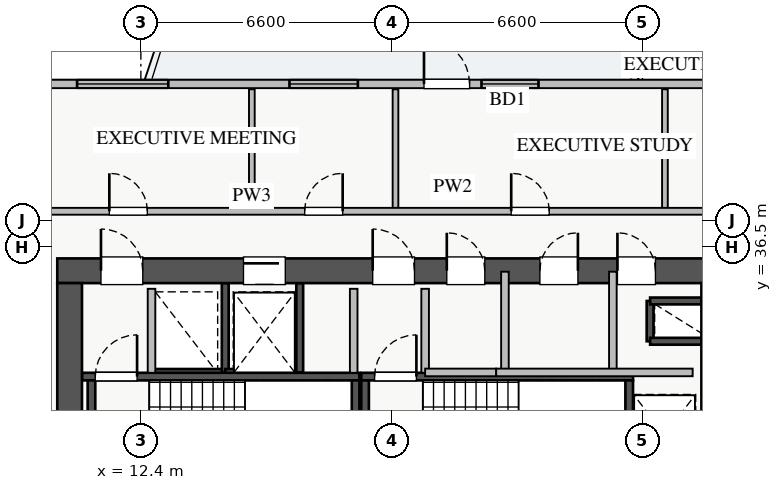
"""IFC4 building model, lengths in metres.
Left out: names, types, materials, properties, quantities, classifications, styles, units other than length and angle.
Written with IfcOpenShell. Run it as: python <this file> out.ifc"""

import sys

from ifc_helpers import new_model, si_unit, direction, frame, frame_2d, origin, place, context, subcontext, project, spatial, rectangle, extrude, source, transform, mapped, element, fill, save


model = new_model("IFC4")
c1 = context("Model", 3, precision=1e-05, world=origin(), true_north=direction((0.0, 1.0)))
c2 = subcontext(c1, "Body", "Model", "MODEL_VIEW")
j1 = project(units=[si_unit("LENGTHUNIT", "METRE"), si_unit("PLANEANGLEUNIT", "RADIAN")], contexts=[c1])
p1 = place(None, origin())
s1 = spatial("IfcSite", under=j1, at=p1, CompositionType="ELEMENT")
p2 = place(p1, origin())
s2 = spatial("IfcBuilding", under=s1, at=p2, CompositionType="ELEMENT")
p3 = place(p2, frame((0.0, 0.0, 100.25)))
s3 = spatial("IfcBuildingStorey", under=s2, at=p3, CompositionType="ELEMENT", Elevation=100.25)
p4 = place(p3, frame((12.68, 33.2, 0.0), z_axis=(0.0, 0.0, 1.0), x_axis=(1.0, 0.0, 0.0)))
e1 = element("IfcWall", 1, at=p4, inside=s3, PredefinedType="SHEAR", context=c2, shape_type="SweptSolid", body=[
    extrude(rectangle(XDim=1.94, YDim=0.18, at=frame_2d((0.97, 0.0))), origin(), (0.0, 0.0, 1.0), 3.07),
])
p5 = place(p3, frame((14.62, 33.2, 0.0), z_axis=(0.0, 0.0, 1.0), x_axis=(0.0, 1.0, 0.0)))
e2 = element("IfcWall", 2, at=p5, inside=s3, PredefinedType="SHEAR", context=c2, shape_type="SweptSolid", body=[
    extrude(rectangle(XDim=2.35, YDim=0.18, at=frame_2d((1.175, 0.0))), origin(), (0.0, 0.0, 1.0), 3.07),
])
p6 = place(p3, frame((25.8, 34.02, 0.0), z_axis=(0.0, 0.0, 1.0), x_axis=(0.0, 1.0, 0.0)))
e3 = element("IfcWall", 3, at=p6, inside=s3, PredefinedType="SHEAR", context=c2, shape_type="SweptSolid", body=[
    extrude(rectangle(XDim=1.06, YDim=0.18, at=frame_2d((0.53, 0.0))), origin(), (0.0, 0.0, 1.0), 3.07),
])
for number, where, z_axis, x_axis in (
    (4, (25.8, 35.08, 0.0), (0.0, 0.0, 1.0), (1.0, 0.0, 0.0)),
    (5, (25.8, 34.02, 0.0), (0.0, 0.0, 1.0), (1.0, 0.0, 0.0)),
):
    element("IfcWall", number, at=place(p3, frame(where, z_axis=z_axis, x_axis=x_axis)), inside=s3, PredefinedType="SHEAR", context=c2, shape_type="SweptSolid", body=[
        extrude(rectangle(XDim=1.35, YDim=0.18, at=frame_2d((0.675, 0.0))), origin(), (0.0, 0.0, 1.0), 3.07),
    ])
p7 = place(p3, frame((14.62, 33.2, 0.0), z_axis=(0.0, 0.0, 1.0), x_axis=(1.0, 0.0, 0.0)))
e6 = element("IfcWall", 6, at=p7, inside=s3, PredefinedType="SHEAR", context=c2, shape_type="SweptSolid", body=[
    extrude(rectangle(XDim=1.96, YDim=0.18, at=frame_2d((0.98, 0.0))), origin(), (0.0, 0.0, 1.0), 3.07),
])
p8 = place(p3, frame((16.58, 33.2, 0.0), z_axis=(0.0, 0.0, 1.0), x_axis=(0.0, 1.0, 0.0)))
e7 = element("IfcWall", 7, at=p8, inside=s3, PredefinedType="SHEAR", context=c2, shape_type="SweptSolid", body=[
    extrude(rectangle(XDim=2.35, YDim=0.18, at=frame_2d((1.175, 0.0))), origin(), (0.0, 0.0, 1.0), 3.07),
])
p9 = place(p3, frame((10.85, 33.09, 0.0), z_axis=(0.0, 0.0, 1.0), x_axis=(1.0, 0.0, 0.0)))
e8 = element("IfcWall", 8, at=p9, inside=s3, PredefinedType="SHEAR", context=c2, shape_type="SweptSolid", body=[
    extrude(rectangle(XDim=7.3, YDim=0.2, at=frame_2d((3.65, 0.0))), origin(), (0.0, 0.0, 1.0), 3.25),
])
p10 = place(p9, frame((0.35, 0.0, 0.0)))
e9 = element("IfcOpeningElement", 9, at=p10, cuts=e8, PredefinedType="OPENING", context=c2, shape_type="SweptSolid", body=[
    extrude(rectangle(XDim=1.1, YDim=2.05, at=frame_2d((0.55, 1.025))), frame((0.0, 0.11, 0.0), z_axis=(0.0, -1.0, 0.0), x_axis=(1.0, 0.0, 0.0)), (0.0, 0.0, 1.0), 0.22),
])
for number, where, z_axis, x_axis in (
    (10, (11.1, 30.05, 0.0), (0.0, 0.0, 1.0), (0.0, 1.0, 0.0)),
    (11, (18.05, 30.05, 0.0), (0.0, 0.0, 1.0), (0.0, 1.0, 0.0)),
):
    element("IfcWall", number, at=place(p3, frame(where, z_axis=z_axis, x_axis=x_axis)), inside=s3, PredefinedType="SHEAR", context=c2, shape_type="SweptSolid", body=[
        extrude(rectangle(XDim=2.94, YDim=0.2, at=frame_2d((1.47, 0.0))), origin(), (0.0, 0.0, 1.0), 3.25),
    ])
p11 = place(p3, frame((18.2, 33.09, 0.0), z_axis=(0.0, 0.0, 1.0), x_axis=(1.0, 0.0, 0.0)))
e12 = element("IfcWall", 12, at=p11, inside=s3, PredefinedType="SHEAR", context=c2, shape_type="SweptSolid", body=[
    extrude(rectangle(XDim=7.15, YDim=0.2, at=frame_2d((3.575, 0.0))), origin(), (0.0, 0.0, 1.0), 3.25),
])
p12 = place(p11, frame((0.35, 0.0, 0.0)))
e13 = element("IfcOpeningElement", 13, at=p12, cuts=e12, PredefinedType="OPENING", context=c2, shape_type="SweptSolid", body=[
    extrude(rectangle(XDim=1.1, YDim=2.05, at=frame_2d((0.55, 1.025))), frame((0.0, 0.11, 0.0), z_axis=(0.0, -1.0, 0.0), x_axis=(1.0, 0.0, 0.0)), (0.0, 0.0, 1.0), 0.22),
])
for number, where, z_axis, x_axis in (
    (14, (18.3, 30.05, 0.0), (0.0, 0.0, 1.0), (0.0, 1.0, 0.0)),
    (15, (25.25, 30.05, 0.0), (0.0, 0.0, 1.0), (0.0, 1.0, 0.0)),
):
    element("IfcWall", number, at=place(p3, frame(where, z_axis=z_axis, x_axis=x_axis)), inside=s3, PredefinedType="SHEAR", context=c2, shape_type="SweptSolid", body=[
        extrude(rectangle(XDim=2.94, YDim=0.2, at=frame_2d((1.47, 0.0))), origin(), (0.0, 0.0, 1.0), 3.25),
    ])
p13 = place(p3, frame((10.2, 35.875, 0.0), z_axis=(0.0, 0.0, 1.0), x_axis=(1.0, 0.0, 0.0)))
e16 = element("IfcWall", 16, at=p13, inside=s3, PredefinedType="SHEAR", context=c2, shape_type="SweptSolid", body=[
    extrude(rectangle(XDim=17.6, YDim=0.65, at=frame_2d((8.8, 0.0))), origin(), (0.0, 0.0, 1.0), 3.25),
])
p14 = place(p13, frame((1.15, 0.0, 0.0)))
e17 = element("IfcOpeningElement", 17, at=p14, cuts=e16, PredefinedType="OPENING", context=c2, shape_type="SweptSolid", body=[
    extrude(rectangle(XDim=1.1, YDim=2.05, at=frame_2d((0.55, 1.025))), frame((0.0, 0.335, 0.0), z_axis=(0.0, -1.0, 0.0), x_axis=(1.0, 0.0, 0.0)), (0.0, 0.0, 1.0), 0.67),
])
p15 = place(p13, frame((8.3, 0.0, 0.0)))
e18 = element("IfcOpeningElement", 18, at=p15, cuts=e16, PredefinedType="OPENING", context=c2, shape_type="SweptSolid", body=[
    extrude(rectangle(XDim=1.1, YDim=2.05, at=frame_2d((0.55, 1.025))), frame((0.0, 0.335, 0.0), z_axis=(0.0, -1.0, 0.0), x_axis=(1.0, 0.0, 0.0)), (0.0, 0.0, 1.0), 0.67),
])
p16 = place(p13, frame((4.9, 0.0, 0.0)))
e19 = element("IfcOpeningElement", 19, at=p16, cuts=e16, PredefinedType="OPENING", context=c2, shape_type="SweptSolid", body=[
    extrude(rectangle(XDim=1.1, YDim=2.05, at=frame_2d((0.55, 1.025))), frame((0.0, 0.335, 0.0), z_axis=(0.0, -1.0, 0.0), x_axis=(1.0, 0.0, 0.0)), (0.0, 0.0, 1.0), 0.67),
])
p17 = place(p13, frame((14.74, 0.0, 0.0)))
e20 = element("IfcOpeningElement", 20, at=p17, cuts=e16, PredefinedType="OPENING", context=c2, shape_type="SweptSolid", body=[
    extrude(rectangle(XDim=1.0, YDim=2.05, at=frame_2d((0.5, 1.025))), frame((0.0, 0.335, 0.0), z_axis=(0.0, -1.0, 0.0), x_axis=(1.0, 0.0, 0.0)), (0.0, 0.0, 1.0), 0.67),
])
p18 = place(p13, frame((10.25, 0.0, 0.0)))
e21 = element("IfcOpeningElement", 21, at=p18, cuts=e16, PredefinedType="OPENING", context=c2, shape_type="SweptSolid", body=[
    extrude(rectangle(XDim=1.0, YDim=2.05, at=frame_2d((0.5, 1.025))), frame((0.0, 0.335, 0.0), z_axis=(0.0, -1.0, 0.0), x_axis=(1.0, 0.0, 0.0)), (0.0, 0.0, 1.0), 0.67),
])
p19 = place(p13, frame((12.7, 0.0, 0.0)))
e22 = element("IfcOpeningElement", 22, at=p19, cuts=e16, PredefinedType="OPENING", context=c2, shape_type="SweptSolid", body=[
    extrude(rectangle(XDim=1.0, YDim=2.05, at=frame_2d((0.5, 1.025))), frame((0.0, 0.335, 0.0), z_axis=(0.0, -1.0, 0.0), x_axis=(1.0, 0.0, 0.0)), (0.0, 0.0, 1.0), 0.67),
])
p20 = place(p3, frame((10.525, 29.65, 0.0), z_axis=(0.0, 0.0, 1.0), x_axis=(0.0, 1.0, 0.0)))
e23 = element("IfcWall", 23, at=p20, inside=s3, PredefinedType="SHEAR", context=c2, shape_type="SweptSolid", body=[
    extrude(rectangle(XDim=5.9, YDim=0.65, at=frame_2d((2.95, 0.0))), origin(), (0.0, 0.0, 1.0), 3.25),
])
p21 = place(p3, frame((27.475, 29.65, 0.0), z_axis=(0.0, 0.0, 1.0), x_axis=(0.0, 1.0, 0.0)))
e24 = element("IfcWall", 24, at=p21, inside=s3, PredefinedType="SHEAR", context=c2, shape_type="SweptSolid", body=[
    extrude(rectangle(XDim=5.9, YDim=0.65, at=frame_2d((2.95, 0.0))), origin(), (0.0, 0.0, 1.0), 3.25),
])
p22 = place(p21, frame((1.1, 0.0, 0.0)))
e25 = element("IfcOpeningElement", 25, at=p22, cuts=e24, PredefinedType="OPENING", context=c2, shape_type="SweptSolid", body=[
    extrude(rectangle(XDim=1.3, YDim=2.05, at=frame_2d((0.65, 1.025))), frame((0.0, 0.335, 0.0), z_axis=(0.0, -1.0, 0.0), x_axis=(1.0, 0.0, 0.0)), (0.0, 0.0, 1.0), 0.67),
])
p23 = place(p3, frame((6.55, 40.79, 0.0), z_axis=(0.0, 0.0, 1.0), x_axis=(1.0, 0.0, 0.0)))
e26 = element("IfcWall", 26, at=p23, inside=s3, PredefinedType="STANDARD", context=c2, shape_type="SweptSolid", body=[
    extrude(rectangle(XDim=24.9, YDim=0.22, at=frame_2d((12.45, 0.0))), origin(), (0.0, 0.0, 1.0), 2.61),
])
p24 = place(p23, frame((13.3, 0.0, 0.0)))
e27 = element("IfcOpeningElement", 27, at=p24, cuts=e26, PredefinedType="OPENING", context=c2, shape_type="SweptSolid", body=[
    extrude(rectangle(XDim=1.2, YDim=2.1, at=frame_2d((0.6, 1.05))), frame((0.0, 0.12, 0.0), z_axis=(0.0, -1.0, 0.0), x_axis=(1.0, 0.0, 0.0)), (0.0, 0.0, 1.0), 0.24),
])
p25 = place(p23, frame((0.393, 0.0, 0.9)))
e28 = element("IfcOpeningElement", 28, at=p25, cuts=e26, PredefinedType="OPENING", context=c2, shape_type="SweptSolid", body=[
    extrude(rectangle(XDim=1.5, YDim=1.5, at=frame_2d((0.75, 0.75))), frame((0.0, 0.12, 0.0), z_axis=(0.0, -1.0, 0.0), x_axis=(1.0, 0.0, 0.0)), (0.0, 0.0, 1.0), 0.24),
])
p26 = place(p23, frame((9.76, 0.0, 0.9)))
e29 = element("IfcOpeningElement", 29, at=p26, cuts=e26, PredefinedType="OPENING", context=c2, shape_type="SweptSolid", body=[
    extrude(rectangle(XDim=1.8, YDim=1.5, at=frame_2d((0.9, 0.75))), frame((0.0, 0.12, 0.0), z_axis=(0.0, -1.0, 0.0), x_axis=(1.0, 0.0, 0.0)), (0.0, 0.0, 1.0), 0.24),
])
p27 = place(p23, frame((14.813, 0.0, 0.9)))
e30 = element("IfcOpeningElement", 30, at=p27, cuts=e26, PredefinedType="OPENING", context=c2, shape_type="SweptSolid", body=[
    extrude(rectangle(XDim=1.5, YDim=1.45, at=frame_2d((0.75, 0.725))), frame((0.0, 0.12, 0.0), z_axis=(0.0, -1.0, 0.0), x_axis=(1.0, 0.0, 0.0)), (0.0, 0.0, 1.0), 0.24),
])
p28 = place(p23, frame((20.738, 0.0, 0.9)))
e31 = element("IfcOpeningElement", 31, at=p28, cuts=e26, PredefinedType="OPENING", context=c2, shape_type="SweptSolid", body=[
    extrude(rectangle(XDim=2.1, YDim=1.48, at=frame_2d((1.05, 0.74))), frame((0.0, 0.12, 0.0), z_axis=(0.0, -1.0, 0.0), x_axis=(1.0, 0.0, 0.0)), (0.0, 0.0, 1.0), 0.24),
])
p29 = place(p23, frame((4.171, 0.0, 0.9)))
e32 = element("IfcOpeningElement", 32, at=p29, cuts=e26, PredefinedType="OPENING", context=c2, shape_type="SweptSolid", body=[
    extrude(rectangle(XDim=2.4, YDim=1.5, at=frame_2d((1.2, 0.75))), frame((0.0, 0.12, 0.0), z_axis=(0.0, -1.0, 0.0), x_axis=(1.0, 0.0, 0.0)), (0.0, 0.0, 1.0), 0.24),
])
for number, where, z_axis, x_axis in (
    (33, (12.68, 33.19, 0.0), (0.0, 0.0, 1.0), (0.0, 1.0, 0.0)),
    (34, (18.0, 33.19, 0.0), (0.0, 0.0, 1.0), (0.0, 1.0, 0.0)),
    (35, (19.88, 33.19, 0.0), (0.0, 0.0, 1.0), (0.0, 1.0, 0.0)),
):
    element("IfcWall", number, at=place(p3, frame(where, z_axis=z_axis, x_axis=x_axis)), inside=s3, PredefinedType="PARTITIONING", context=c2, shape_type="SweptSolid", body=[
        extrude(rectangle(XDim=2.21, YDim=0.2, at=frame_2d((1.105, 0.0))), origin(), (0.0, 0.0, 1.0), 3.07),
    ])
p30 = place(p3, frame((24.82, 33.2, 0.0), z_axis=(0.0, 0.0, 1.0), x_axis=(0.0, 1.0, 0.0)))
e36 = element("IfcWall", 36, at=p30, inside=s3, PredefinedType="PARTITIONING", context=c2, shape_type="SweptSolid", body=[
    extrude(rectangle(XDim=2.65, YDim=0.2, at=frame_2d((1.325, 0.0))), origin(), (0.0, 0.0, 1.0), 3.07),
])
p31 = place(p3, frame((19.88, 33.2, 0.0), z_axis=(0.0, 0.0, 1.0), x_axis=(1.0, 0.0, 0.0)))
e37 = element("IfcWall", 37, at=p31, inside=s3, PredefinedType="PARTITIONING", context=c2, shape_type="SweptSolid", body=[
    extrude(rectangle(XDim=1.87, YDim=0.2, at=frame_2d((0.935, 0.0))), origin(), (0.0, 0.0, 1.0), 3.07),
])
p32 = place(p3, frame((21.98, 33.2, 0.0), z_axis=(0.0, 0.0, 1.0), x_axis=(0.0, 1.0, 0.0)))
e38 = element("IfcWall", 38, at=p32, inside=s3, PredefinedType="PARTITIONING", context=c2, shape_type="SweptSolid", body=[
    extrude(rectangle(XDim=2.65, YDim=0.2, at=frame_2d((1.325, 0.0))), origin(), (0.0, 0.0, 1.0), 3.07),
])
p33 = place(p3, frame((21.75, 33.2, 0.0), z_axis=(0.0, 0.0, 1.0), x_axis=(1.0, 0.0, 0.0)))
e39 = element("IfcWall", 39, at=p33, inside=s3, PredefinedType="PARTITIONING", context=c2, shape_type="SweptSolid", body=[
    extrude(rectangle(XDim=5.17, YDim=0.2, at=frame_2d((2.585, 0.0))), origin(), (0.0, 0.0, 1.0), 3.07),
])
p34 = place(p3, frame((15.32, 37.44, 0.0), z_axis=(0.0, 0.0, 1.0), x_axis=(0.0, 1.0, 0.0)))
e40 = element("IfcWall", 40, at=p34, inside=s3, PredefinedType="PARTITIONING", context=c2, shape_type="SweptSolid", body=[
    extrude(rectangle(XDim=3.21, YDim=0.15, at=frame_2d((1.605, 0.0))), origin(), (0.0, 0.0, 1.0), 3.07),
])
p35 = place(p3, frame((19.1, 37.44, 0.0), z_axis=(0.0, 0.0, 1.0), x_axis=(0.0, 1.0, 0.0)))
e41 = element("IfcWall", 41, at=p35, inside=s3, PredefinedType="PARTITIONING", context=c2, shape_type="SweptSolid", body=[
    extrude(rectangle(XDim=3.21, YDim=0.15, at=frame_2d((1.605, 0.0))), origin(), (0.0, 0.0, 1.0), 2.821),
])
p36 = place(p3, frame((26.19, 37.44, 0.0), z_axis=(0.0, 0.0, 1.0), x_axis=(0.0, 1.0, 0.0)))
e42 = element("IfcWall", 42, at=p36, inside=s3, PredefinedType="PARTITIONING", context=c2, shape_type="SweptSolid", body=[
    extrude(rectangle(XDim=3.21, YDim=0.15, at=frame_2d((1.605, 0.0))), origin(), (0.0, 0.0, 1.0), 3.07),
])
p37 = place(p3, frame((8.82, 37.44, 0.0), z_axis=(0.0, 0.0, 1.0), x_axis=(1.0, 0.0, 0.0)))
e43 = element("IfcWall", 43, at=p37, inside=s3, PredefinedType="PARTITIONING", context=c2, shape_type="SweptSolid", body=[
    extrude(rectangle(XDim=23.58, YDim=0.18, at=frame_2d((11.79, 0.0))), origin(), (0.0, 0.0, 1.0), 3.07),
])
p38 = place(p37, frame((2.75, 0.0, 0.0)))
e44 = element("IfcOpeningElement", 44, at=p38, cuts=e43, PredefinedType="OPENING", context=c2, shape_type="SweptSolid", body=[
    extrude(rectangle(XDim=1.0, YDim=2.05, at=frame_2d((0.5, 1.025))), frame((0.0, 0.1, 0.0), z_axis=(0.0, -1.0, 0.0), x_axis=(1.0, 0.0, 0.0)), (0.0, 0.0, 1.0), 0.2),
])
p39 = place(p37, frame((7.89, 0.0, 0.0)))
e45 = element("IfcOpeningElement", 45, at=p39, cuts=e43, PredefinedType="OPENING", context=c2, shape_type="SweptSolid", body=[
    extrude(rectangle(XDim=1.0, YDim=2.05, at=frame_2d((0.5, 1.025))), frame((0.0, 0.1, 0.0), z_axis=(0.0, -1.0, 0.0), x_axis=(1.0, 0.0, 0.0)), (0.0, 0.0, 1.0), 0.2),
])
p40 = place(p37, frame((13.325, 0.0, 0.0)))
e46 = element("IfcOpeningElement", 46, at=p40, cuts=e43, PredefinedType="OPENING", context=c2, shape_type="SweptSolid", body=[
    extrude(rectangle(XDim=1.0, YDim=2.05, at=frame_2d((0.5, 1.025))), frame((0.0, 0.1, 0.0), z_axis=(0.0, -1.0, 0.0), x_axis=(1.0, 0.0, 0.0)), (0.0, 0.0, 1.0), 0.2),
])
p41 = place(p37, frame((19.765, 0.0, 0.0)))
e47 = element("IfcOpeningElement", 47, at=p41, cuts=e43, PredefinedType="OPENING", context=c2, shape_type="SweptSolid", body=[
    extrude(rectangle(XDim=1.0, YDim=2.05, at=frame_2d((0.5, 1.025))), frame((0.0, 0.1, 0.0), z_axis=(0.0, -1.0, 0.0), x_axis=(1.0, 0.0, 0.0)), (0.0, 0.0, 1.0), 0.2),
])
m1 = source(origin(), c2, "Body", "SweptSolid", [
    extrude(rectangle(XDim=1.2, YDim=2.1, at=frame_2d((0.6, 1.05))), frame((0.0, 0.025, 0.0), z_axis=(0.0, -1.0, 0.0), x_axis=(1.0, 0.0, 0.0)), (0.0, 0.0, 1.0), 0.05),
])
p42 = place(p24, origin())
e48 = element("IfcDoor", 48, at=p42, inside=s3, OperationType="SINGLE_SWING_LEFT", PredefinedType="DOOR", context=c2, shape_type="MappedRepresentation", body=[
    mapped(m1, transform((0.0, 0.0, 0.0), x_axis=(1.0, 0.0, 0.0), y_axis=(0.0, 1.0, 0.0), z_axis=(0.0, 0.0, 1.0), scale=1.0)),
])
fill(e27, e48)
m2 = source(origin(), c2, "Body", "SweptSolid", [
    extrude(rectangle(XDim=1.8, YDim=1.5, at=frame_2d((0.9, 0.75))), frame((0.0, 0.03, 0.0), z_axis=(0.0, -1.0, 0.0), x_axis=(1.0, 0.0, 0.0)), (0.0, 0.0, 1.0), 0.06),
])
p43 = place(p26, origin())
e49 = element("IfcWindow", 49, at=p43, inside=s3, PartitioningType="DOUBLE_PANEL_VERTICAL", PredefinedType="WINDOW", context=c2, shape_type="MappedRepresentation", body=[
    mapped(m2, transform((0.0, 0.0, 0.0), x_axis=(1.0, 0.0, 0.0), y_axis=(0.0, 1.0, 0.0), z_axis=(0.0, 0.0, 1.0), scale=1.0)),
])
fill(e29, e49)
m3 = source(origin(), c2, "Body", "SweptSolid", [
    extrude(rectangle(XDim=1.5, YDim=1.45, at=frame_2d((0.75, 0.725))), frame((0.0, 0.03, 0.0), z_axis=(0.0, -1.0, 0.0), x_axis=(1.0, 0.0, 0.0)), (0.0, 0.0, 1.0), 0.06),
])
p44 = place(p27, origin())
e50 = element("IfcWindow", 50, at=p44, inside=s3, PartitioningType="DOUBLE_PANEL_VERTICAL", PredefinedType="WINDOW", context=c2, shape_type="MappedRepresentation", body=[
    mapped(m3, transform((0.0, 0.0, 0.0), x_axis=(1.0, 0.0, 0.0), y_axis=(0.0, 1.0, 0.0), z_axis=(0.0, 0.0, 1.0), scale=1.0)),
])
fill(e30, e50)
m4 = source(origin(), c2, "Body", "SweptSolid", [
    extrude(rectangle(XDim=1.1, YDim=2.05, at=frame_2d((0.55, 1.025))), frame((0.0, 0.025, 0.0), z_axis=(0.0, -1.0, 0.0), x_axis=(1.0, 0.0, 0.0)), (0.0, 0.0, 1.0), 0.05),
])
p45 = place(p14, origin())
e51 = element("IfcDoor", 51, at=p45, inside=s3, OperationType="SINGLE_SWING_LEFT", PredefinedType="DOOR", context=c2, shape_type="MappedRepresentation", body=[
    mapped(m4, transform((0.0, 0.0, 0.0), x_axis=(1.0, 0.0, 0.0), y_axis=(0.0, 1.0, 0.0), z_axis=(0.0, 0.0, 1.0), scale=1.0)),
])
fill(e17, e51)
p46 = place(p10, origin())
e52 = element("IfcDoor", 52, at=p46, inside=s3, OperationType="SINGLE_SWING_RIGHT", PredefinedType="DOOR", context=c2, shape_type="MappedRepresentation", body=[
    mapped(m4, transform((0.0, 0.0, 0.0), x_axis=(1.0, 0.0, 0.0), y_axis=(0.0, 1.0, 0.0), z_axis=(0.0, 0.0, 1.0), scale=1.0)),
])
fill(e9, e52)
p47 = place(p15, origin())
e53 = element("IfcDoor", 53, at=p47, inside=s3, OperationType="SINGLE_SWING_LEFT", PredefinedType="DOOR", context=c2, shape_type="MappedRepresentation", body=[
    mapped(m4, transform((0.0, 0.0, 0.0), x_axis=(1.0, 0.0, 0.0), y_axis=(0.0, 1.0, 0.0), z_axis=(0.0, 0.0, 1.0), scale=1.0)),
])
fill(e18, e53)
p48 = place(p12, origin())
e54 = element("IfcDoor", 54, at=p48, inside=s3, OperationType="SINGLE_SWING_RIGHT", PredefinedType="DOOR", context=c2, shape_type="MappedRepresentation", body=[
    mapped(m4, transform((0.0, 0.0, 0.0), x_axis=(1.0, 0.0, 0.0), y_axis=(0.0, 1.0, 0.0), z_axis=(0.0, 0.0, 1.0), scale=1.0)),
])
fill(e13, e54)
p49 = place(p16, origin())
e55 = element("IfcDoor", 55, at=p49, inside=s3, OperationType="SLIDING_TO_LEFT", PredefinedType="DOOR", context=c2, shape_type="MappedRepresentation", body=[
    mapped(m4, transform((0.0, 0.0, 0.0), x_axis=(1.0, 0.0, 0.0), y_axis=(0.0, 1.0, 0.0), z_axis=(0.0, 0.0, 1.0), scale=1.0)),
])
fill(e19, e55)
m5 = source(origin(), c2, "Body", "SweptSolid", [
    extrude(rectangle(XDim=1.0, YDim=2.05, at=frame_2d((0.5, 1.025))), frame((0.0, 0.025, 0.0), z_axis=(0.0, -1.0, 0.0), x_axis=(1.0, 0.0, 0.0)), (0.0, 0.0, 1.0), 0.05),
])
p50 = place(p17, origin())
e56 = element("IfcDoor", 56, at=p50, inside=s3, OperationType="SINGLE_SWING_LEFT", PredefinedType="DOOR", context=c2, shape_type="MappedRepresentation", body=[
    mapped(m5, transform((0.0, 0.0, 0.0), x_axis=(1.0, 0.0, 0.0), y_axis=(0.0, 1.0, 0.0), z_axis=(0.0, 0.0, 1.0), scale=1.0)),
])
fill(e20, e56)
p51 = place(p18, origin())
e57 = element("IfcDoor", 57, at=p51, inside=s3, OperationType="SINGLE_SWING_LEFT", PredefinedType="DOOR", context=c2, shape_type="MappedRepresentation", body=[
    mapped(m5, transform((0.0, 0.0, 0.0), x_axis=(1.0, 0.0, 0.0), y_axis=(0.0, 1.0, 0.0), z_axis=(0.0, 0.0, 1.0), scale=1.0)),
])
fill(e21, e57)
p52 = place(p19, origin())
e58 = element("IfcDoor", 58, at=p52, inside=s3, OperationType="SINGLE_SWING_RIGHT", PredefinedType="DOOR", context=c2, shape_type="MappedRepresentation", body=[
    mapped(m5, transform((0.0, 0.0, 0.0), x_axis=(1.0, 0.0, 0.0), y_axis=(0.0, 1.0, 0.0), z_axis=(0.0, 0.0, 1.0), scale=1.0)),
])
fill(e22, e58)
p53 = place(p38, origin())
e59 = element("IfcDoor", 59, at=p53, inside=s3, OperationType="SINGLE_SWING_LEFT", PredefinedType="DOOR", context=c2, shape_type="MappedRepresentation", body=[
    mapped(m5, transform((0.0, 0.0, 0.0), x_axis=(1.0, 0.0, 0.0), y_axis=(0.0, 1.0, 0.0), z_axis=(0.0, 0.0, 1.0), scale=1.0)),
])
fill(e44, e59)
p54 = place(p39, origin())
e60 = element("IfcDoor", 60, at=p54, inside=s3, OperationType="SINGLE_SWING_RIGHT", PredefinedType="DOOR", context=c2, shape_type="MappedRepresentation", body=[
    mapped(m5, transform((0.0, 0.0, 0.0), x_axis=(1.0, 0.0, 0.0), y_axis=(0.0, 1.0, 0.0), z_axis=(0.0, 0.0, 1.0), scale=1.0)),
])
fill(e45, e60)
p55 = place(p40, origin())
e61 = element("IfcDoor", 61, at=p55, inside=s3, OperationType="SINGLE_SWING_LEFT", PredefinedType="DOOR", context=c2, shape_type="MappedRepresentation", body=[
    mapped(m5, transform((0.0, 0.0, 0.0), x_axis=(1.0, 0.0, 0.0), y_axis=(0.0, 1.0, 0.0), z_axis=(0.0, 0.0, 1.0), scale=1.0)),
])
fill(e46, e61)
m6 = source(origin(), c2, "Body", "SweptSolid", [
    extrude(rectangle(XDim=2.4, YDim=1.5, at=frame_2d((1.2, 0.75))), frame((0.0, 0.03, 0.0), z_axis=(0.0, -1.0, 0.0), x_axis=(1.0, 0.0, 0.0)), (0.0, 0.0, 1.0), 0.06),
])
p56 = place(p29, origin())
e62 = element("IfcWindow", 62, at=p56, inside=s3, PartitioningType="TRIPLE_PANEL_VERTICAL", PredefinedType="WINDOW", context=c2, shape_type="MappedRepresentation", body=[
    mapped(m6, transform((0.0, 0.0, 0.0), x_axis=(1.0, 0.0, 0.0), y_axis=(0.0, 1.0, 0.0), z_axis=(0.0, 0.0, 1.0), scale=1.0)),
])
fill(e32, e62)
save(model, sys.argv[1])
